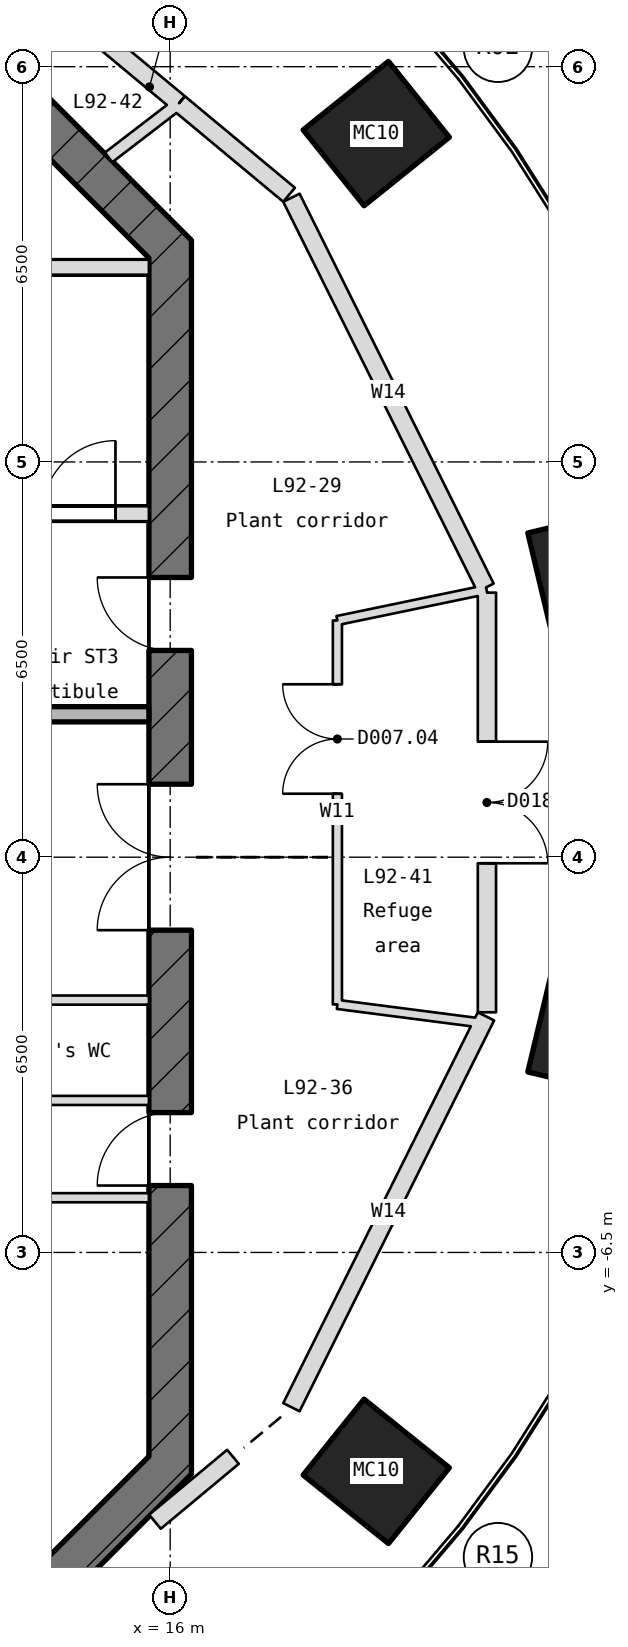
"""IFC4 building model, lengths in metres.
Left out: names, types, materials, properties, quantities, classifications, styles, units other than length and angle.
Written with IfcOpenShell. Run it as: python <this file> out.ifc"""

import sys

from ifc_helpers import new_model, si_unit, direction, frame, frame_2d, origin, place, context, subcontext, project, spatial, polyline, rectangle, outline, extrude, element, fill, save


model = new_model("IFC4")
c1 = context("Model", 3, precision=1e-05, world=origin(), true_north=direction((0.0, 1.0)))
c2 = subcontext(c1, "Body", "Model", "MODEL_VIEW")
j1 = project(units=[si_unit("LENGTHUNIT", "METRE"), si_unit("PLANEANGLEUNIT", "RADIAN")], contexts=[c1])
p1 = place(None, origin())
s1 = spatial("IfcSite", under=j1, at=p1, CompositionType="ELEMENT")
p2 = place(p1, origin())
s2 = spatial("IfcBuilding", under=s1, at=p2, CompositionType="ELEMENT")
p3 = place(p2, frame((0.0, 0.0, 407.55)))
s3 = spatial("IfcBuildingStorey", under=s2, at=p3, CompositionType="ELEMENT", Elevation=407.55)
p4 = place(p3, frame((0.0, 0.0, -0.3)))
e1 = element("IfcColumn", 1, at=p4, inside=s3, PredefinedType="COLUMN", context=c2, shape_type="SweptSolid", body=[
    extrude(outline(polyline([(21.82, 3.704), (21.448, 5.26), (23.198, 5.679), (23.632, 5.75), (24.004, 4.194), (22.253, 3.775), (21.82, 3.704)])), origin(), (0.0, 0.0, 1.0), 6.1),
])
p5 = place(p3, frame((0.0, 0.0, -0.3)))
e2 = element("IfcColumn", 2, at=p5, inside=s3, PredefinedType="COLUMN", context=c2, shape_type="SweptSolid", body=[
    extrude(outline(polyline([(18.821, 10.51), (17.819, 11.758), (19.222, 12.885), (19.59, 13.088), (20.592, 11.84), (19.188, 10.713), (18.821, 10.51)])), origin(), (0.0, 0.0, 1.0), 6.1),
])
p6 = place(p3, frame((0.0, 0.0, -0.3)))
e3 = element("IfcColumn", 3, at=p6, inside=s3, PredefinedType="COLUMN", context=c2, shape_type="SweptSolid", body=[
    extrude(outline(polyline([(19.59, -11.288), (19.222, -11.085), (17.819, -9.958), (18.821, -8.71), (19.188, -8.913), (20.592, -10.04), (19.59, -11.288)])), origin(), (0.0, 0.0, 1.0), 6.1),
])
p7 = place(p3, frame((0.0, 0.0, -0.3)))
e4 = element("IfcColumn", 4, at=p7, inside=s3, PredefinedType="COLUMN", context=c2, shape_type="SweptSolid", body=[
    extrude(outline(polyline([(23.632, -3.95), (23.198, -3.879), (21.448, -3.46), (21.82, -1.904), (22.253, -1.975), (24.004, -2.394), (23.632, -3.95)])), origin(), (0.0, 0.0, 1.0), 6.1),
])
p8 = place(p3, frame((12.897, -13.103, -0.3), z_axis=(0.0, 0.0, 1.0), x_axis=(0.707106781187, 0.707106781187, 0.0)))
e5 = element("IfcWall", 5, at=p8, inside=s3, PredefinedType="SHEAR", context=c2, shape_type="SweptSolid", body=[
    extrude(rectangle(XDim=4.533, YDim=0.7, at=frame_2d((2.266, 0.0))), origin(), (0.0, 0.0, 1.0), 6.1),
])
p9 = place(p3, frame((16.0, -10.145, -0.3), z_axis=(0.0, 0.0, 1.0), x_axis=(0.0, 1.0, 0.0)))
e6 = element("IfcWall", 6, at=p9, inside=s3, PredefinedType="SHEAR", context=c2, shape_type="SweptSolid", body=[
    extrude(rectangle(XDim=20.29, YDim=0.7, at=frame_2d((10.145, 0.0))), origin(), (0.0, 0.0, 1.0), 6.1),
])
p10 = place(p9, frame((8.945, 0.0, 0.3)))
e7 = element("IfcOpeningElement", 7, at=p10, cuts=e6, PredefinedType="OPENING", context=c2, shape_type="SweptSolid", body=[
    extrude(rectangle(XDim=2.4, YDim=2.1, at=frame_2d((1.2, 1.05))), frame((0.0, 0.36, 0.0), z_axis=(0.0, -1.0, 0.0), x_axis=(1.0, 0.0, 0.0)), (0.0, 0.0, 1.0), 0.72),
])
p11 = place(p9, frame((13.545, 0.0, 0.3)))
e8 = element("IfcOpeningElement", 8, at=p11, cuts=e6, PredefinedType="OPENING", context=c2, shape_type="SweptSolid", body=[
    extrude(rectangle(XDim=1.2, YDim=2.1, at=frame_2d((0.6, 1.05))), frame((0.0, 0.36, 0.0), z_axis=(0.0, -1.0, 0.0), x_axis=(1.0, 0.0, 0.0)), (0.0, 0.0, 1.0), 0.72),
])
p12 = place(p9, frame((4.745, 0.0, 0.3)))
e9 = element("IfcOpeningElement", 9, at=p12, cuts=e6, PredefinedType="OPENING", context=c2, shape_type="SweptSolid", body=[
    extrude(rectangle(XDim=1.2, YDim=2.1, at=frame_2d((0.6, 1.05))), frame((0.0, 0.36, 0.0), z_axis=(0.0, -1.0, 0.0), x_axis=(1.0, 0.0, 0.0)), (0.0, 0.0, 1.0), 0.72),
])
p13 = place(p3, frame((16.103, 9.897, -0.3), z_axis=(0.0, 0.0, 1.0), x_axis=(-0.707106781187, 0.707106781187, 0.0)))
e10 = element("IfcWall", 10, at=p13, inside=s3, PredefinedType="SHEAR", context=c2, shape_type="SweptSolid", body=[
    extrude(rectangle(XDim=4.533, YDim=0.7, at=frame_2d((2.266, 0.0))), origin(), (0.0, 0.0, 1.0), 6.1),
])
p14 = place(p3, frame((8.55, -5.6, 0.0), z_axis=(0.0, 0.0, 1.0), x_axis=(1.0, 0.0, 0.0)))
e11 = element("IfcWall", 11, at=p14, inside=s3, PredefinedType="PARTITIONING", context=c2, shape_type="SweptSolid", body=[
    extrude(rectangle(XDim=7.1, YDim=0.15, at=frame_2d((3.55, 0.0))), origin(), (0.0, 0.0, 1.0), 5.8),
])
p15 = place(p14, frame((2.975, 0.0, 0.0)))
e12 = element("IfcOpeningElement", 12, at=p15, cuts=e11, PredefinedType="OPENING", context=c2, shape_type="SweptSolid", body=[
    extrude(rectangle(XDim=1.0, YDim=2.1, at=frame_2d((0.5, 1.05))), frame((0.0, 0.085, 0.0), z_axis=(0.0, -1.0, 0.0), x_axis=(1.0, 0.0, 0.0)), (0.0, 0.0, 1.0), 0.17),
])
p16 = place(p3, frame((8.55, -4.0, 0.0), z_axis=(0.0, 0.0, 1.0), x_axis=(1.0, 0.0, 0.0)))
e13 = element("IfcWall", 13, at=p16, inside=s3, PredefinedType="PARTITIONING", context=c2, shape_type="SweptSolid", body=[
    extrude(rectangle(XDim=7.1, YDim=0.15, at=frame_2d((3.55, 0.0))), origin(), (0.0, 0.0, 1.0), 5.8),
])
p17 = place(p16, frame((2.975, 0.0, 0.0)))
e14 = element("IfcOpeningElement", 14, at=p17, cuts=e13, PredefinedType="OPENING", context=c2, shape_type="SweptSolid", body=[
    extrude(rectangle(XDim=1.0, YDim=2.1, at=frame_2d((0.5, 1.05))), frame((0.0, 0.085, 0.0), z_axis=(0.0, -1.0, 0.0), x_axis=(1.0, 0.0, 0.0)), (0.0, 0.0, 1.0), 0.17),
])
p18 = place(p3, frame((8.4, -2.35, 0.0), z_axis=(0.0, 0.0, 1.0), x_axis=(1.0, 0.0, 0.0)))
e15 = element("IfcWall", 15, at=p18, inside=s3, PredefinedType="PARTITIONING", context=c2, shape_type="SweptSolid", body=[
    extrude(rectangle(XDim=7.25, YDim=0.15, at=frame_2d((3.625, 0.0))), origin(), (0.0, 0.0, 1.0), 5.8),
])
p19 = place(p3, frame((8.4, 2.35, 0.0), z_axis=(0.0, 0.0, 1.0), x_axis=(1.0, 0.0, 0.0)))
e16 = element("IfcWall", 16, at=p19, inside=s3, PredefinedType="STANDARD", context=c2, shape_type="SweptSolid", body=[
    extrude(rectangle(XDim=7.25, YDim=0.25, at=frame_2d((3.625, 0.0))), origin(), (0.0, 0.0, 1.0), 5.8),
])
p20 = place(p3, frame((8.55, 5.65, -0.3), z_axis=(0.0, 0.0, 1.0), x_axis=(1.0, 0.0, 0.0)))
e17 = element("IfcWall", 17, at=p20, inside=s3, PredefinedType="SHEAR", context=c2, shape_type="SweptSolid", body=[
    extrude(rectangle(XDim=7.1, YDim=0.25, at=frame_2d((3.55, 0.0))), origin(), (0.0, 0.0, 1.0), 6.1),
])
p21 = place(p20, frame((5.35, 0.0, 0.3)))
e18 = element("IfcOpeningElement", 18, at=p21, cuts=e17, PredefinedType="OPENING", context=c2, shape_type="SweptSolid", body=[
    extrude(rectangle(XDim=1.2, YDim=2.1, at=frame_2d((0.6, 1.05))), frame((0.0, 0.135, 0.0), z_axis=(0.0, -1.0, 0.0), x_axis=(1.0, 0.0, 0.0)), (0.0, 0.0, 1.0), 0.27),
])
p22 = place(p3, frame((8.55, 9.7, -0.3), z_axis=(0.0, 0.0, 1.0), x_axis=(1.0, 0.0, 0.0)))
e19 = element("IfcWall", 19, at=p22, inside=s3, PredefinedType="SHEAR", context=c2, shape_type="SweptSolid", body=[
    extrude(rectangle(XDim=7.1, YDim=0.25, at=frame_2d((3.55, 0.0))), origin(), (0.0, 0.0, 1.0), 6.1),
])
p23 = place(p3, frame((16.145, 12.4, 0.0), z_axis=(0.0, 0.0, 1.0), x_axis=(-0.768729274682, 0.63957431331, 0.0)))
e20 = element("IfcWall", 20, at=p23, inside=s3, PredefinedType="STANDARD", context=c2, shape_type="SweptSolid", body=[
    extrude(rectangle(XDim=3.701, YDim=0.3, at=frame_2d((1.851, 0.0))), origin(), (0.0, 0.0, 1.0), 5.8),
])
p24 = place(p3, frame((21.209, -2.55, 0.0), z_axis=(0.0, 0.0, 1.0), x_axis=(0.0, 1.0, 0.0)))
e21 = element("IfcWall", 21, at=p24, inside=s3, PredefinedType="STANDARD", context=c2, shape_type="SweptSolid", body=[
    extrude(rectangle(XDim=6.901, YDim=0.3, at=frame_2d((3.45, 0.0))), origin(), (0.0, 0.0, 1.0), 5.8),
])
p25 = place(p24, frame((2.45, 0.0, 0.0)))
e22 = element("IfcOpeningElement", 22, at=p25, cuts=e21, PredefinedType="OPENING", context=c2, shape_type="SweptSolid", body=[
    extrude(rectangle(XDim=2.0, YDim=2.1, at=frame_2d((1.0, 1.05))), frame((0.0, 0.16, 0.0), z_axis=(0.0, -1.0, 0.0), x_axis=(1.0, 0.0, 0.0)), (0.0, 0.0, 1.0), 0.32),
])
p26 = place(p3, frame((15.75, -10.928, 0.0), z_axis=(0.0, 0.0, 1.0), x_axis=(0.768724548227, 0.639579994178, 0.0)))
e23 = element("IfcWall", 23, at=p26, inside=s3, PredefinedType="STANDARD", context=c2, shape_type="SweptSolid", body=[
    extrude(rectangle(XDim=1.669, YDim=0.3, at=frame_2d((0.834, 0.0))), origin(), (0.0, 0.0, 1.0), 5.8),
])
p27 = place(p3, frame((17.994, -9.045, 0.0), z_axis=(0.0, 0.0, 1.0), x_axis=(0.445635189334, 0.895214654721, 0.0)))
e24 = element("IfcWall", 24, at=p27, inside=s3, PredefinedType="STANDARD", context=c2, shape_type="SweptSolid", body=[
    extrude(rectangle(XDim=7.18, YDim=0.3, at=frame_2d((3.59, 0.0))), origin(), (0.0, 0.0, 1.0), 5.8),
])
p28 = place(p3, frame((21.186, 4.433, 0.0), z_axis=(0.0, 0.0, 1.0), x_axis=(-0.445631337991, 0.895216571898, 0.0)))
e25 = element("IfcWall", 25, at=p28, inside=s3, PredefinedType="STANDARD", context=c2, shape_type="SweptSolid", body=[
    extrude(rectangle(XDim=7.163, YDim=0.3, at=frame_2d((3.581, 0.0))), origin(), (0.0, 0.0, 1.0), 5.8),
])
p29 = place(p3, frame((17.955, 10.893, 0.0), z_axis=(0.0, 0.0, 1.0), x_axis=(-0.768688803044, 0.639622954618, 0.0)))
e26 = element("IfcWall", 26, at=p29, inside=s3, PredefinedType="STANDARD", context=c2, shape_type="SweptSolid", body=[
    extrude(rectangle(XDim=2.353, YDim=0.3, at=frame_2d((1.177, 0.0))), origin(), (0.0, 0.0, 1.0), 5.8),
])
p30 = place(p3, frame((18.75, 3.892, 0.0), z_axis=(0.0, 0.0, 1.0), x_axis=(0.979114064269, 0.203311704412, 0.0)))
e27 = element("IfcWall", 27, at=p30, inside=s3, PredefinedType="PARTITIONING", context=c2, shape_type="SweptSolid", body=[
    extrude(rectangle(XDim=2.504, YDim=0.15, at=frame_2d((1.252, 0.0))), origin(), (0.0, 0.0, 1.0), 5.447),
])
p31 = place(p3, frame((18.75, -2.421, 0.0), z_axis=(0.0, 0.0, 1.0), x_axis=(0.0, 1.0, 0.0)))
e28 = element("IfcWall", 28, at=p31, inside=s3, PredefinedType="PARTITIONING", context=c2, shape_type="SweptSolid", body=[
    extrude(rectangle(XDim=6.314, YDim=0.15, at=frame_2d((3.157, 0.0))), origin(), (0.0, 0.0, 1.0), 5.8),
])
p32 = place(p31, frame((3.465, 0.0, 0.0)))
e29 = element("IfcOpeningElement", 29, at=p32, cuts=e28, PredefinedType="OPENING", context=c2, shape_type="SweptSolid", body=[
    extrude(rectangle(XDim=1.8, YDim=2.1, at=frame_2d((0.9, 1.05))), frame((0.0, 0.085, 0.0), z_axis=(0.0, -1.0, 0.0), x_axis=(1.0, 0.0, 0.0)), (0.0, 0.0, 1.0), 0.17),
])
p33 = place(p3, frame((21.138, -2.73, 0.0), z_axis=(0.0, 0.0, 1.0), x_axis=(-0.991764160055, 0.128077518829, 0.0)))
e30 = element("IfcWall", 30, at=p33, inside=s3, PredefinedType="PARTITIONING", context=c2, shape_type="SweptSolid", body=[
    extrude(rectangle(XDim=2.407, YDim=0.15, at=frame_2d((1.204, 0.0))), origin(), (0.0, 0.0, 1.0), 5.447),
])
p34 = place(p3, frame((14.987, 11.508, 0.0), z_axis=(0.0, 0.0, 1.0), x_axis=(0.793114198042, 0.609072958572, 0.0)))
e31 = element("IfcWall", 31, at=p34, inside=s3, PredefinedType="PARTITIONING", context=c2, shape_type="SweptSolid", body=[
    extrude(rectangle(XDim=1.462, YDim=0.2, at=frame_2d((0.731, 0.0))), origin(), (0.0, 0.0, 1.0), 5.8),
])
p35 = place(p21, origin())
e32 = element("IfcDoor", 32, at=p35, inside=s3, OperationType="SINGLE_SWING_RIGHT", PredefinedType="DOOR", context=c2, shape_type="SweptSolid", body=[
    extrude(rectangle(XDim=1.2, YDim=2.1, at=frame_2d((0.6, 1.05))), frame((0.0, 0.025, 0.0), z_axis=(0.0, -1.0, 0.0), x_axis=(1.0, 0.0, 0.0)), (0.0, 0.0, 1.0), 0.05),
])
fill(e18, e32)
p36 = place(p10, origin())
e33 = element("IfcDoor", 33, at=p36, inside=s3, OperationType="DOUBLE_DOOR_SINGLE_SWING", PredefinedType="DOOR", context=c2, shape_type="SweptSolid", body=[
    extrude(rectangle(XDim=2.4, YDim=2.1, at=frame_2d((1.2, 1.05))), frame((0.0, 0.025, 0.0), z_axis=(0.0, -1.0, 0.0), x_axis=(1.0, 0.0, 0.0)), (0.0, 0.0, 1.0), 0.05),
])
fill(e7, e33)
p37 = place(p11, origin())
e34 = element("IfcDoor", 34, at=p37, inside=s3, OperationType="SINGLE_SWING_RIGHT", PredefinedType="DOOR", context=c2, shape_type="SweptSolid", body=[
    extrude(rectangle(XDim=1.2, YDim=2.1, at=frame_2d((0.6, 1.05))), frame((0.0, 0.025, 0.0), z_axis=(0.0, -1.0, 0.0), x_axis=(1.0, 0.0, 0.0)), (0.0, 0.0, 1.0), 0.05),
])
fill(e8, e34)
p38 = place(p12, origin())
e35 = element("IfcDoor", 35, at=p38, inside=s3, OperationType="SINGLE_SWING_RIGHT", PredefinedType="DOOR", context=c2, shape_type="SweptSolid", body=[
    extrude(rectangle(XDim=1.2, YDim=2.1, at=frame_2d((0.6, 1.05))), frame((0.0, 0.025, 0.0), z_axis=(0.0, -1.0, 0.0), x_axis=(1.0, 0.0, 0.0)), (0.0, 0.0, 1.0), 0.05),
])
fill(e9, e35)
p39 = place(p32, origin())
e36 = element("IfcDoor", 36, at=p39, inside=s3, OperationType="DOUBLE_DOOR_SINGLE_SWING", PredefinedType="DOOR", context=c2, shape_type="SweptSolid", body=[
    extrude(rectangle(XDim=1.8, YDim=2.1, at=frame_2d((0.9, 1.05))), frame((0.0, 0.025, 0.0), z_axis=(0.0, -1.0, 0.0), x_axis=(1.0, 0.0, 0.0)), (0.0, 0.0, 1.0), 0.05),
])
fill(e29, e36)
p40 = place(p25, frame((2.0, 0.0, 0.0), z_axis=(0.0, 0.0, 1.0), x_axis=(-1.0, 0.0, 0.0)))
e37 = element("IfcDoor", 37, at=p40, inside=s3, OperationType="DOUBLE_DOOR_SINGLE_SWING", PredefinedType="DOOR", context=c2, shape_type="SweptSolid", body=[
    extrude(rectangle(XDim=2.0, YDim=2.1, at=frame_2d((1.0, 1.05))), frame((0.0, 0.025, 0.0), z_axis=(0.0, -1.0, 0.0), x_axis=(1.0, 0.0, 0.0)), (0.0, 0.0, 1.0), 0.05),
])
fill(e22, e37)
save(model, sys.argv[1])
